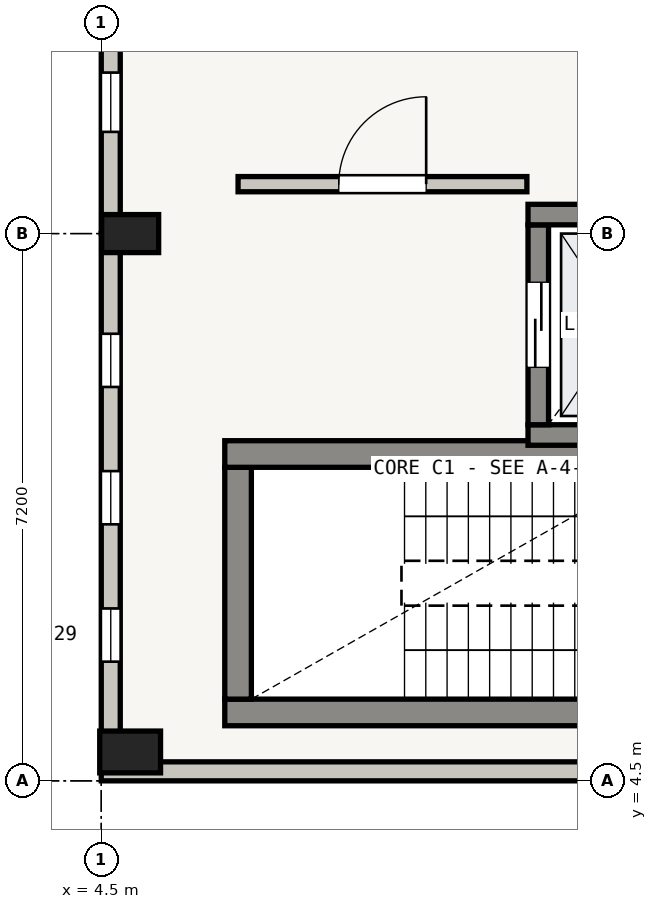
"""IFC4 building model, lengths in metres.
Left out: names, types, materials, properties, quantities, classifications, styles, units other than length and angle.
Written with IfcOpenShell. Run it as: python <this file> out.ifc"""

import sys

from ifc_helpers import new_model, si_unit, direction, frame, frame_2d, origin, origin_2d, place, context, subcontext, project, spatial, rectangle, extrude, element, fill, save


model = new_model("IFC4")
c1 = context("Model", 3, precision=1e-05, world=origin(), true_north=direction((0.0, 1.0)))
c2 = subcontext(c1, "Body", "Model", "MODEL_VIEW")
j1 = project(units=[si_unit("LENGTHUNIT", "METRE"), si_unit("PLANEANGLEUNIT", "RADIAN")], contexts=[c1])
p1 = place(None, origin())
s1 = spatial("IfcSite", under=j1, at=p1, CompositionType="ELEMENT")
p2 = place(p1, origin())
s2 = spatial("IfcBuilding", under=s1, at=p2, CompositionType="ELEMENT")
p3 = place(p2, frame((0.0, 0.0, 21.15)))
s3 = spatial("IfcBuildingStorey", under=s2, at=p3, CompositionType="ELEMENT", Elevation=21.15)
p4 = place(p3, frame((4.88, 4.88, 0.0), z_axis=(0.0, 0.0, 1.0), x_axis=(1.0, 0.0, 0.0)))
e1 = element("IfcColumn", 1, at=p4, inside=s3, PredefinedType="COLUMN", context=c2, shape_type="SweptSolid", body=[
    extrude(rectangle(XDim=0.8, YDim=0.55, at=origin_2d()), origin(), (0.0, 0.0, 1.0), 3.62),
])
p5 = place(p3, frame((4.88, 11.7, 0.0), z_axis=(0.0, 0.0, 1.0), x_axis=(1.0, 0.0, 0.0)))
e2 = element("IfcColumn", 2, at=p5, inside=s3, PredefinedType="COLUMN", context=c2, shape_type="SweptSolid", body=[
    extrude(rectangle(XDim=0.75, YDim=0.5, at=origin_2d()), origin(), (0.0, 0.0, 1.0), 3.62),
])
p6 = place(p3, frame((11.7, 4.625, 0.0), z_axis=(0.0, 0.0, 1.0), x_axis=(-1.0, 0.0, 0.0)))
e3 = element("IfcWall", 3, at=p6, inside=s3, PredefinedType="STANDARD", context=c2, shape_type="SweptSolid", body=[
    extrude(rectangle(XDim=7.2, YDim=0.25, at=frame_2d((3.6, 0.0))), origin(), (0.0, 0.0, 1.0), 3.055),
])
p7 = place(p3, frame((4.625, 4.75, 0.0), z_axis=(0.0, 0.0, 1.0), x_axis=(0.0, 1.0, 0.0)))
e4 = element("IfcWall", 4, at=p7, inside=s3, PredefinedType="STANDARD", context=c2, shape_type="SweptSolid", body=[
    extrude(rectangle(XDim=6.95, YDim=0.25, at=frame_2d((3.475, 0.0))), origin(), (0.0, 0.0, 1.0), 3.005),
])
p8 = place(p7, frame((1.318, 0.0, 0.6)))
e5 = element("IfcOpeningElement", 5, at=p8, cuts=e4, PredefinedType="OPENING", context=c2, shape_type="SweptSolid", body=[
    extrude(rectangle(XDim=0.7, YDim=1.92, at=frame_2d((0.35, 0.96))), frame((0.0, 0.125, 0.0), z_axis=(0.0, -1.0, 0.0), x_axis=(1.0, 0.0, 0.0)), (0.0, 0.0, 1.0), 0.25),
])
p9 = place(p7, frame((3.125, 0.0, 0.6)))
e6 = element("IfcOpeningElement", 6, at=p9, cuts=e4, PredefinedType="OPENING", context=c2, shape_type="SweptSolid", body=[
    extrude(rectangle(XDim=0.7, YDim=1.92, at=frame_2d((0.35, 0.96))), frame((0.0, 0.125, 0.0), z_axis=(0.0, -1.0, 0.0), x_axis=(1.0, 0.0, 0.0)), (0.0, 0.0, 1.0), 0.25),
])
p10 = place(p7, frame((4.932, 0.0, 0.6)))
e7 = element("IfcOpeningElement", 7, at=p10, cuts=e4, PredefinedType="OPENING", context=c2, shape_type="SweptSolid", body=[
    extrude(rectangle(XDim=0.7, YDim=1.92, at=frame_2d((0.35, 0.96))), frame((0.0, 0.125, 0.0), z_axis=(0.0, -1.0, 0.0), x_axis=(1.0, 0.0, 0.0)), (0.0, 0.0, 1.0), 0.25),
])
p11 = place(p3, frame((4.625, 11.7, 0.0), z_axis=(0.0, 0.0, 1.0), x_axis=(0.0, 1.0, 0.0)))
e8 = element("IfcWall", 8, at=p11, inside=s3, PredefinedType="STANDARD", context=c2, shape_type="SweptSolid", body=[
    extrude(rectangle(XDim=7.2, YDim=0.25, at=frame_2d((3.6, 0.0))), origin(), (0.0, 0.0, 1.0), 3.005),
])
p12 = place(p11, frame((1.338, 0.0, 0.6)))
e9 = element("IfcOpeningElement", 9, at=p12, cuts=e8, PredefinedType="OPENING", context=c2, shape_type="SweptSolid", body=[
    extrude(rectangle(XDim=0.78, YDim=1.95, at=frame_2d((0.39, 0.975))), frame((0.0, 0.125, 0.0), z_axis=(0.0, -1.0, 0.0), x_axis=(1.0, 0.0, 0.0)), (0.0, 0.0, 1.0), 0.25),
])
p13 = place(p11, frame((2.46, 0.0, 0.6)))
e10 = element("IfcOpeningElement", 10, at=p13, cuts=e8, PredefinedType="OPENING", context=c2, shape_type="SweptSolid", body=[
    extrude(rectangle(XDim=0.78, YDim=1.95, at=frame_2d((0.39, 0.975))), frame((0.0, 0.125, 0.0), z_axis=(0.0, -1.0, 0.0), x_axis=(1.0, 0.0, 0.0)), (0.0, 0.0, 1.0), 0.25),
])
p14 = place(p11, frame((5.082, 0.0, 0.6)))
e11 = element("IfcOpeningElement", 11, at=p14, cuts=e8, PredefinedType="OPENING", context=c2, shape_type="SweptSolid", body=[
    extrude(rectangle(XDim=0.78, YDim=1.95, at=frame_2d((0.39, 0.975))), frame((0.0, 0.125, 0.0), z_axis=(0.0, -1.0, 0.0), x_axis=(1.0, 0.0, 0.0)), (0.0, 0.0, 1.0), 0.25),
])
p15 = place(p3, frame((13.475, 5.4, 0.0), z_axis=(0.0, 0.0, 1.0), x_axis=(-1.0, 0.0, 0.0)))
e12 = element("IfcWall", 12, at=p15, inside=s3, PredefinedType="SHEAR", context=c2, shape_type="SweptSolid", body=[
    extrude(rectangle(XDim=7.35, YDim=0.35, at=frame_2d((3.675, 0.0))), origin(), (0.0, 0.0, 1.0), 3.62),
])
p16 = place(p3, frame((6.3, 5.575, 0.0), z_axis=(0.0, 0.0, 1.0), x_axis=(0.0, 1.0, 0.0)))
e13 = element("IfcWall", 13, at=p16, inside=s3, PredefinedType="SHEAR", context=c2, shape_type="SweptSolid", body=[
    extrude(rectangle(XDim=3.05, YDim=0.35, at=frame_2d((1.525, 0.0))), origin(), (0.0, 0.0, 1.0), 3.62),
])
p17 = place(p3, frame((6.125, 8.8, 0.0), z_axis=(0.0, 0.0, 1.0), x_axis=(1.0, 0.0, 0.0)))
e14 = element("IfcWall", 14, at=p17, inside=s3, PredefinedType="SHEAR", context=c2, shape_type="SweptSolid", body=[
    extrude(rectangle(XDim=7.35, YDim=0.35, at=frame_2d((3.675, 0.0))), origin(), (0.0, 0.0, 1.0), 3.62),
])
p18 = place(p3, frame((12.585, 9.05, 0.0), z_axis=(0.0, 0.0, 1.0), x_axis=(-1.0, 0.0, 0.0)))
e15 = element("IfcWall", 15, at=p18, inside=s3, PredefinedType="SHEAR", context=c2, shape_type="SweptSolid", body=[
    extrude(rectangle(XDim=2.47, YDim=0.27, at=frame_2d((1.235, 0.0))), origin(), (0.0, 0.0, 1.0), 3.62),
])
p19 = place(p3, frame((10.25, 9.185, 0.0), z_axis=(0.0, 0.0, 1.0), x_axis=(0.0, 1.0, 0.0)))
e16 = element("IfcWall", 16, at=p19, inside=s3, PredefinedType="SHEAR", context=c2, shape_type="SweptSolid", body=[
    extrude(rectangle(XDim=2.63, YDim=0.27, at=frame_2d((1.315, 0.0))), origin(), (0.0, 0.0, 1.0), 3.62),
])
p20 = place(p19, frame((0.755, 0.0, 0.0)))
e17 = element("IfcOpeningElement", 17, at=p20, cuts=e16, PredefinedType="OPENING", context=c2, shape_type="SweptSolid", body=[
    extrude(rectangle(XDim=1.12, YDim=2.1, at=frame_2d((0.56, 1.05))), frame((0.0, 0.135, 0.0), z_axis=(0.0, -1.0, 0.0), x_axis=(1.0, 0.0, 0.0)), (0.0, 0.0, 1.0), 0.27),
])
p21 = place(p3, frame((10.115, 11.95, 0.0), z_axis=(0.0, 0.0, 1.0), x_axis=(1.0, 0.0, 0.0)))
e18 = element("IfcWall", 18, at=p21, inside=s3, PredefinedType="SHEAR", context=c2, shape_type="SweptSolid", body=[
    extrude(rectangle(XDim=2.47, YDim=0.27, at=frame_2d((1.235, 0.0))), origin(), (0.0, 0.0, 1.0), 3.62),
])
p22 = place(p3, frame((6.3, 12.35, 0.0), z_axis=(0.0, 0.0, 1.0), x_axis=(1.0, 0.0, 0.0)))
e19 = element("IfcWall", 19, at=p22, inside=s3, PredefinedType="SOLIDWALL", context=c2, shape_type="SweptSolid", body=[
    extrude(rectangle(XDim=3.8, YDim=0.2, at=frame_2d((1.9, 0.0))), origin(), (0.0, 0.0, 1.0), 2.64),
])
p23 = place(p22, frame((1.325, 0.0, 0.0)))
e20 = element("IfcOpeningElement", 20, at=p23, cuts=e19, PredefinedType="OPENING", context=c2, shape_type="SweptSolid", body=[
    extrude(rectangle(XDim=1.15, YDim=2.05, at=frame_2d((0.575, 1.025))), frame((0.0, 0.1, 0.0), z_axis=(0.0, -1.0, 0.0), x_axis=(1.0, 0.0, 0.0)), (0.0, 0.0, 1.0), 0.2),
])
p24 = place(p8, origin())
e21 = element("IfcWindow", 21, at=p24, inside=s3, PartitioningType="SINGLE_PANEL", PredefinedType="WINDOW", context=c2, shape_type="SweptSolid", body=[
    extrude(rectangle(XDim=0.7, YDim=1.92, at=frame_2d((0.35, 0.96))), frame((0.0, 0.03, 0.0), z_axis=(0.0, -1.0, 0.0), x_axis=(1.0, 0.0, 0.0)), (0.0, 0.0, 1.0), 0.06),
])
fill(e5, e21)
p25 = place(p9, origin())
e22 = element("IfcWindow", 22, at=p25, inside=s3, PartitioningType="SINGLE_PANEL", PredefinedType="WINDOW", context=c2, shape_type="SweptSolid", body=[
    extrude(rectangle(XDim=0.7, YDim=1.92, at=frame_2d((0.35, 0.96))), frame((0.0, 0.03, 0.0), z_axis=(0.0, -1.0, 0.0), x_axis=(1.0, 0.0, 0.0)), (0.0, 0.0, 1.0), 0.06),
])
fill(e6, e22)
p26 = place(p10, origin())
e23 = element("IfcWindow", 23, at=p26, inside=s3, PartitioningType="SINGLE_PANEL", PredefinedType="WINDOW", context=c2, shape_type="SweptSolid", body=[
    extrude(rectangle(XDim=0.7, YDim=1.92, at=frame_2d((0.35, 0.96))), frame((0.0, 0.03, 0.0), z_axis=(0.0, -1.0, 0.0), x_axis=(1.0, 0.0, 0.0)), (0.0, 0.0, 1.0), 0.06),
])
fill(e7, e23)
p27 = place(p12, origin())
e24 = element("IfcWindow", 24, at=p27, inside=s3, PartitioningType="SINGLE_PANEL", PredefinedType="WINDOW", context=c2, shape_type="SweptSolid", body=[
    extrude(rectangle(XDim=0.78, YDim=1.95, at=frame_2d((0.39, 0.975))), frame((0.0, 0.03, 0.0), z_axis=(0.0, -1.0, 0.0), x_axis=(1.0, 0.0, 0.0)), (0.0, 0.0, 1.0), 0.06),
])
fill(e9, e24)
p28 = place(p20, origin())
e25 = element("IfcDoor", 25, at=p28, inside=s3, OperationType="DOUBLE_DOOR_SLIDING", PredefinedType="DOOR", context=c2, shape_type="SweptSolid", body=[
    extrude(rectangle(XDim=1.12, YDim=2.1, at=frame_2d((0.56, 1.05))), frame((0.0, 0.025, 0.0), z_axis=(0.0, -1.0, 0.0), x_axis=(1.0, 0.0, 0.0)), (0.0, 0.0, 1.0), 0.05),
])
fill(e17, e25)
p29 = place(p23, origin())
e26 = element("IfcDoor", 26, at=p29, inside=s3, OperationType="SINGLE_SWING_RIGHT", PredefinedType="DOOR", context=c2, shape_type="SweptSolid", body=[
    extrude(rectangle(XDim=1.15, YDim=2.05, at=frame_2d((0.575, 1.025))), frame((0.0, 0.025, 0.0), z_axis=(0.0, -1.0, 0.0), x_axis=(1.0, 0.0, 0.0)), (0.0, 0.0, 1.0), 0.05),
])
fill(e20, e26)
save(model, sys.argv[1])
